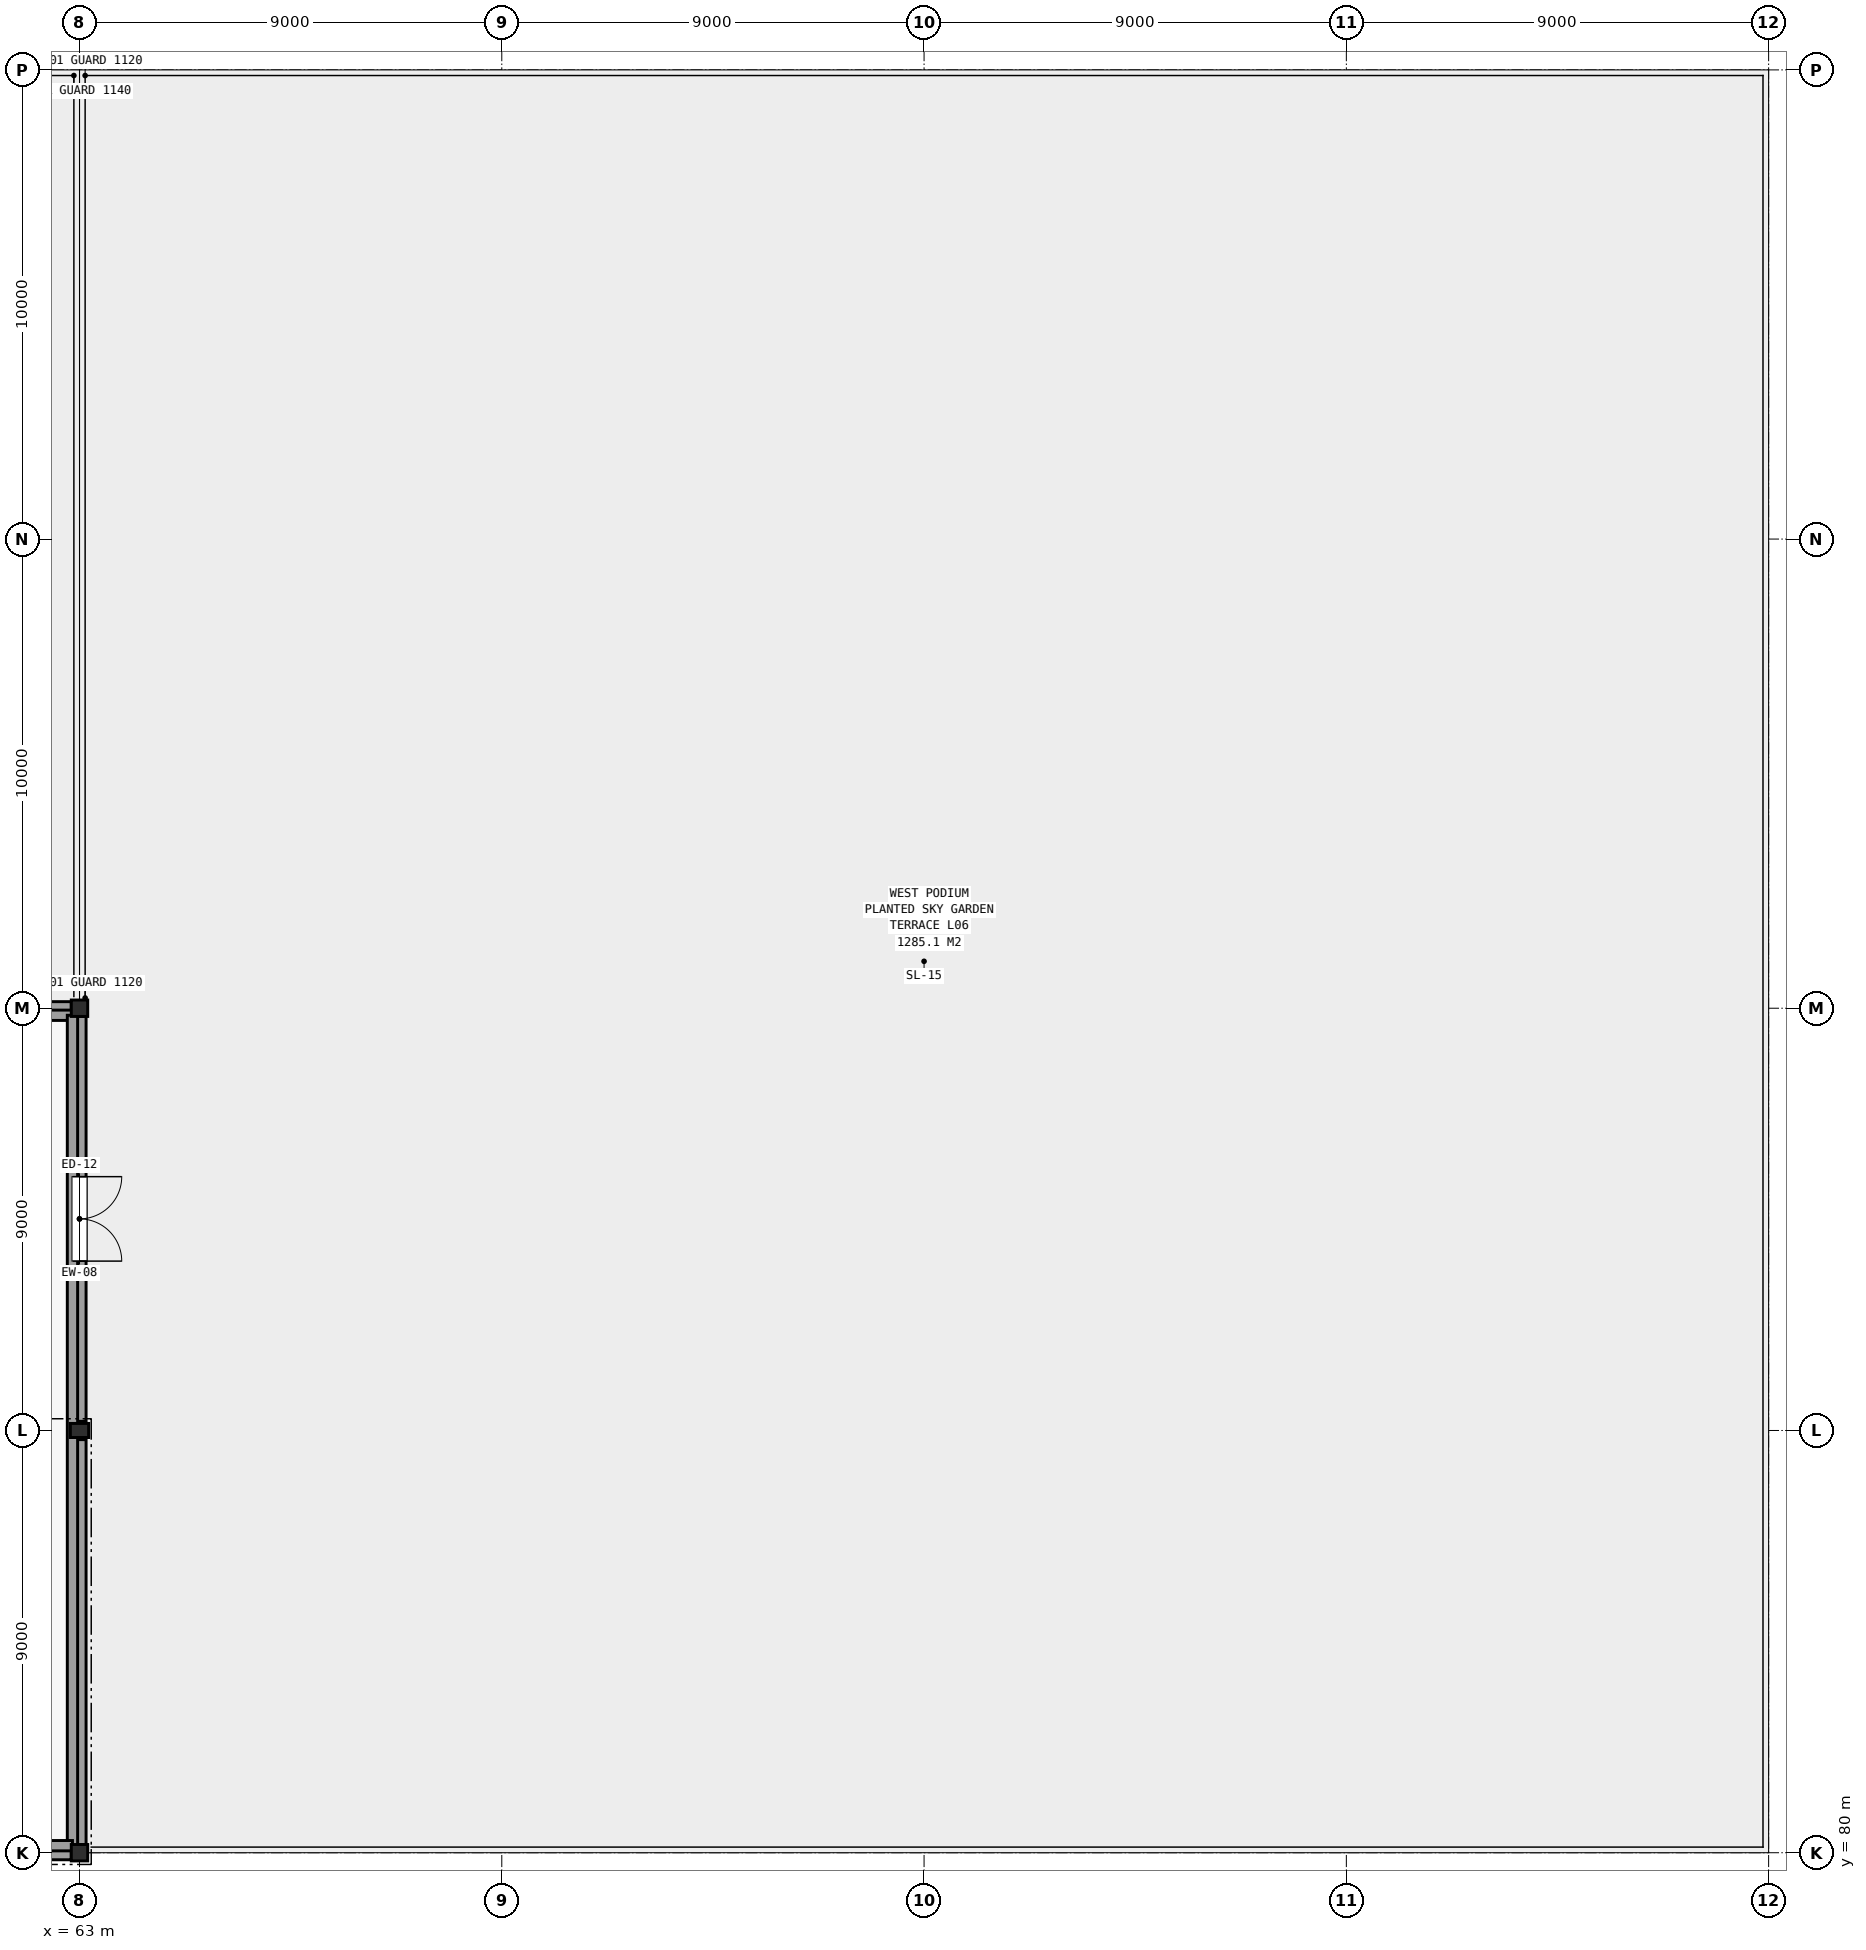
"""IFC4 building model, lengths in metres.
Left out: names, types, materials, properties, quantities, classifications, styles, units other than length and angle.
Written with IfcOpenShell. Run it as: python <this file> out.ifc"""

import sys

from ifc_helpers import new_model, si_unit, direction, frame, frame_2d, origin, origin_2d, place, context, subcontext, project, spatial, rectangle, hollow_rectangle, i_section, extrude, element, fill, save


model = new_model("IFC4")
c1 = context("Model", 3, precision=1e-05, world=origin(), true_north=direction((0.0, 1.0)))
c2 = subcontext(c1, "Body", "Model", "MODEL_VIEW")
j1 = project(units=[si_unit("LENGTHUNIT", "METRE"), si_unit("PLANEANGLEUNIT", "RADIAN")], contexts=[c1])
p1 = place(None, origin())
s1 = spatial("IfcSite", under=j1, at=p1, CompositionType="ELEMENT")
p2 = place(p1, origin())
s2 = spatial("IfcBuilding", under=s1, at=p2, CompositionType="ELEMENT")
p3 = place(p2, frame((0.0, 0.0, 26.1)))
s3 = spatial("IfcBuildingStorey", under=s2, at=p3, CompositionType="ELEMENT", Elevation=26.1)
p4 = place(p3, frame((63.0, 80.0, 0.0), z_axis=(0.0, 0.0, 1.0), x_axis=(1.0, 0.0, 0.0)))
e1 = element("IfcColumn", 1, at=p4, inside=s3, PredefinedType="COLUMN", context=c2, shape_type="SweptSolid", body=[
    extrude(hollow_rectangle(XDim=0.35, YDim=0.35, WallThickness=0.016, at=origin_2d()), origin(), (0.0, 0.0, 1.0), 4.14),
])
p5 = place(p3, frame((63.0, 89.0, 0.0), z_axis=(0.0, 0.0, 1.0), x_axis=(1.0, 0.0, 0.0)))
e2 = element("IfcColumn", 2, at=p5, inside=s3, PredefinedType="COLUMN", context=c2, shape_type="SweptSolid", body=[
    extrude(i_section(OverallWidth=0.3, OverallDepth=0.39, WebThickness=0.01, FlangeThickness=0.016, FilletRadius=0.013, at=origin_2d()), origin(), (0.0, 0.0, 1.0), 4.14),
])
p6 = place(p3, frame((63.0, 98.0, 0.0), z_axis=(0.0, 0.0, 1.0), x_axis=(1.0, 0.0, 0.0)))
e3 = element("IfcColumn", 3, at=p6, inside=s3, PredefinedType="COLUMN", context=c2, shape_type="SweptSolid", body=[
    extrude(hollow_rectangle(XDim=0.35, YDim=0.35, WallThickness=0.016, at=origin_2d()), origin(), (0.0, 0.0, 1.0), 4.14),
])
p7 = place(p3, frame((54.175, 80.0, 0.0), z_axis=(0.0, 0.0, 1.0), x_axis=(1.0, 0.0, 0.0)))
e4 = element("IfcWall", 4, at=p7, inside=s3, PredefinedType="SOLIDWALL", context=c2, shape_type="SweptSolid", body=[
    extrude(rectangle(XDim=8.65, YDim=0.3, at=frame_2d((4.325, 0.0))), origin(), (0.0, 0.0, 1.0), 3.94),
])
p8 = place(p7, frame((3.425, 0.0, 0.95)))
e5 = element("IfcOpeningElement", 5, at=p8, cuts=e4, PredefinedType="OPENING", context=c2, shape_type="SweptSolid", body=[
    extrude(rectangle(XDim=1.8, YDim=2.2, at=frame_2d((0.9, 1.1))), frame((0.0, 0.161, 0.0), z_axis=(0.0, -1.0, 0.0), x_axis=(1.0, 0.0, 0.0)), (0.0, 0.0, 1.0), 0.322),
])
p9 = place(p3, frame((63.0, 80.175, 0.0), z_axis=(0.0, 0.0, 1.0), x_axis=(0.0, 1.0, 0.0)))
e6 = element("IfcWall", 6, at=p9, inside=s3, PredefinedType="SOLIDWALL", context=c2, shape_type="SweptSolid", body=[
    extrude(rectangle(XDim=8.63, YDim=0.28, at=frame_2d((4.315, 0.0))), origin(), (0.0, 0.0, 1.0), 3.94),
])
p10 = place(p3, frame((63.0, 89.195, 0.0), z_axis=(0.0, 0.0, 1.0), x_axis=(0.0, 1.0, 0.0)))
e7 = element("IfcWall", 7, at=p10, inside=s3, PredefinedType="SOLIDWALL", context=c2, shape_type="SweptSolid", body=[
    extrude(rectangle(XDim=8.63, YDim=0.28, at=frame_2d((4.315, 0.0))), origin(), (0.0, 0.0, 1.0), 3.94),
])
p11 = place(p10, frame((5.215, 0.0, 0.0), z_axis=(0.0, 0.0, 1.0), x_axis=(-1.0, 0.0, 0.0)))
e8 = element("IfcOpeningElement", 8, at=p11, cuts=e7, PredefinedType="OPENING", context=c2, shape_type="SweptSolid", body=[
    extrude(rectangle(XDim=1.8, YDim=2.2, at=frame_2d((0.9, 1.1))), frame((0.0, 0.151, 0.0), z_axis=(0.0, -1.0, 0.0), x_axis=(1.0, 0.0, 0.0)), (0.0, 0.0, 1.0), 0.302),
])
p12 = place(p3, frame((62.825, 98.0, 0.0), z_axis=(0.0, 0.0, 1.0), x_axis=(-1.0, 0.0, 0.0)))
e9 = element("IfcWall", 9, at=p12, inside=s3, PredefinedType="SOLIDWALL", context=c2, shape_type="SweptSolid", body=[
    extrude(rectangle(XDim=8.65, YDim=0.28, at=frame_2d((4.325, 0.0))), origin(), (0.0, 0.0, 1.0), 3.94),
])
p13 = place(p12, frame((5.125, 0.0, 0.0), z_axis=(0.0, 0.0, 1.0), x_axis=(-1.0, 0.0, 0.0)))
e10 = element("IfcOpeningElement", 10, at=p13, cuts=e9, PredefinedType="OPENING", context=c2, shape_type="SweptSolid", body=[
    extrude(rectangle(XDim=1.6, YDim=2.2, at=frame_2d((0.8, 1.1))), frame((0.0, 0.151, 0.0), z_axis=(0.0, -1.0, 0.0), x_axis=(1.0, 0.0, 0.0)), (0.0, 0.0, 1.0), 0.302),
])
for number, where, z_axis, x_axis in (
    (11, (45.15, 97.85, 4.2), (0.0, 0.0, 1.0), (1.0, 0.0, 0.0)),
    (12, (62.85, 97.85, 4.2), (0.0, 0.0, 1.0), (0.0, -1.0, 0.0)),
    (13, (62.85, 80.15, 4.2), (0.0, 0.0, 1.0), (-1.0, 0.0, 0.0)),
):
    element("IfcWall", number, at=place(p3, frame(where, z_axis=z_axis, x_axis=x_axis)), inside=s3, PredefinedType="PARAPET", context=c2, shape_type="SweptSolid", body=[
        extrude(rectangle(XDim=17.7, YDim=0.22, at=frame_2d((8.85, 0.0))), origin(), (0.0, 0.0, 1.0), 0.52),
    ])
p14 = place(p11, origin())
e14 = element("IfcDoor", 14, at=p14, inside=s3, OperationType="SINGLE_SWING_LEFT", PredefinedType="DOOR", context=c2, shape_type="SweptSolid", body=[
    extrude(rectangle(XDim=1.8, YDim=2.2, at=frame_2d((0.9, 1.1))), frame((0.0, 0.025, 0.0), z_axis=(0.0, -1.0, 0.0), x_axis=(1.0, 0.0, 0.0)), (0.0, 0.0, 1.0), 0.05),
])
fill(e8, e14)
save(model, sys.argv[1])
